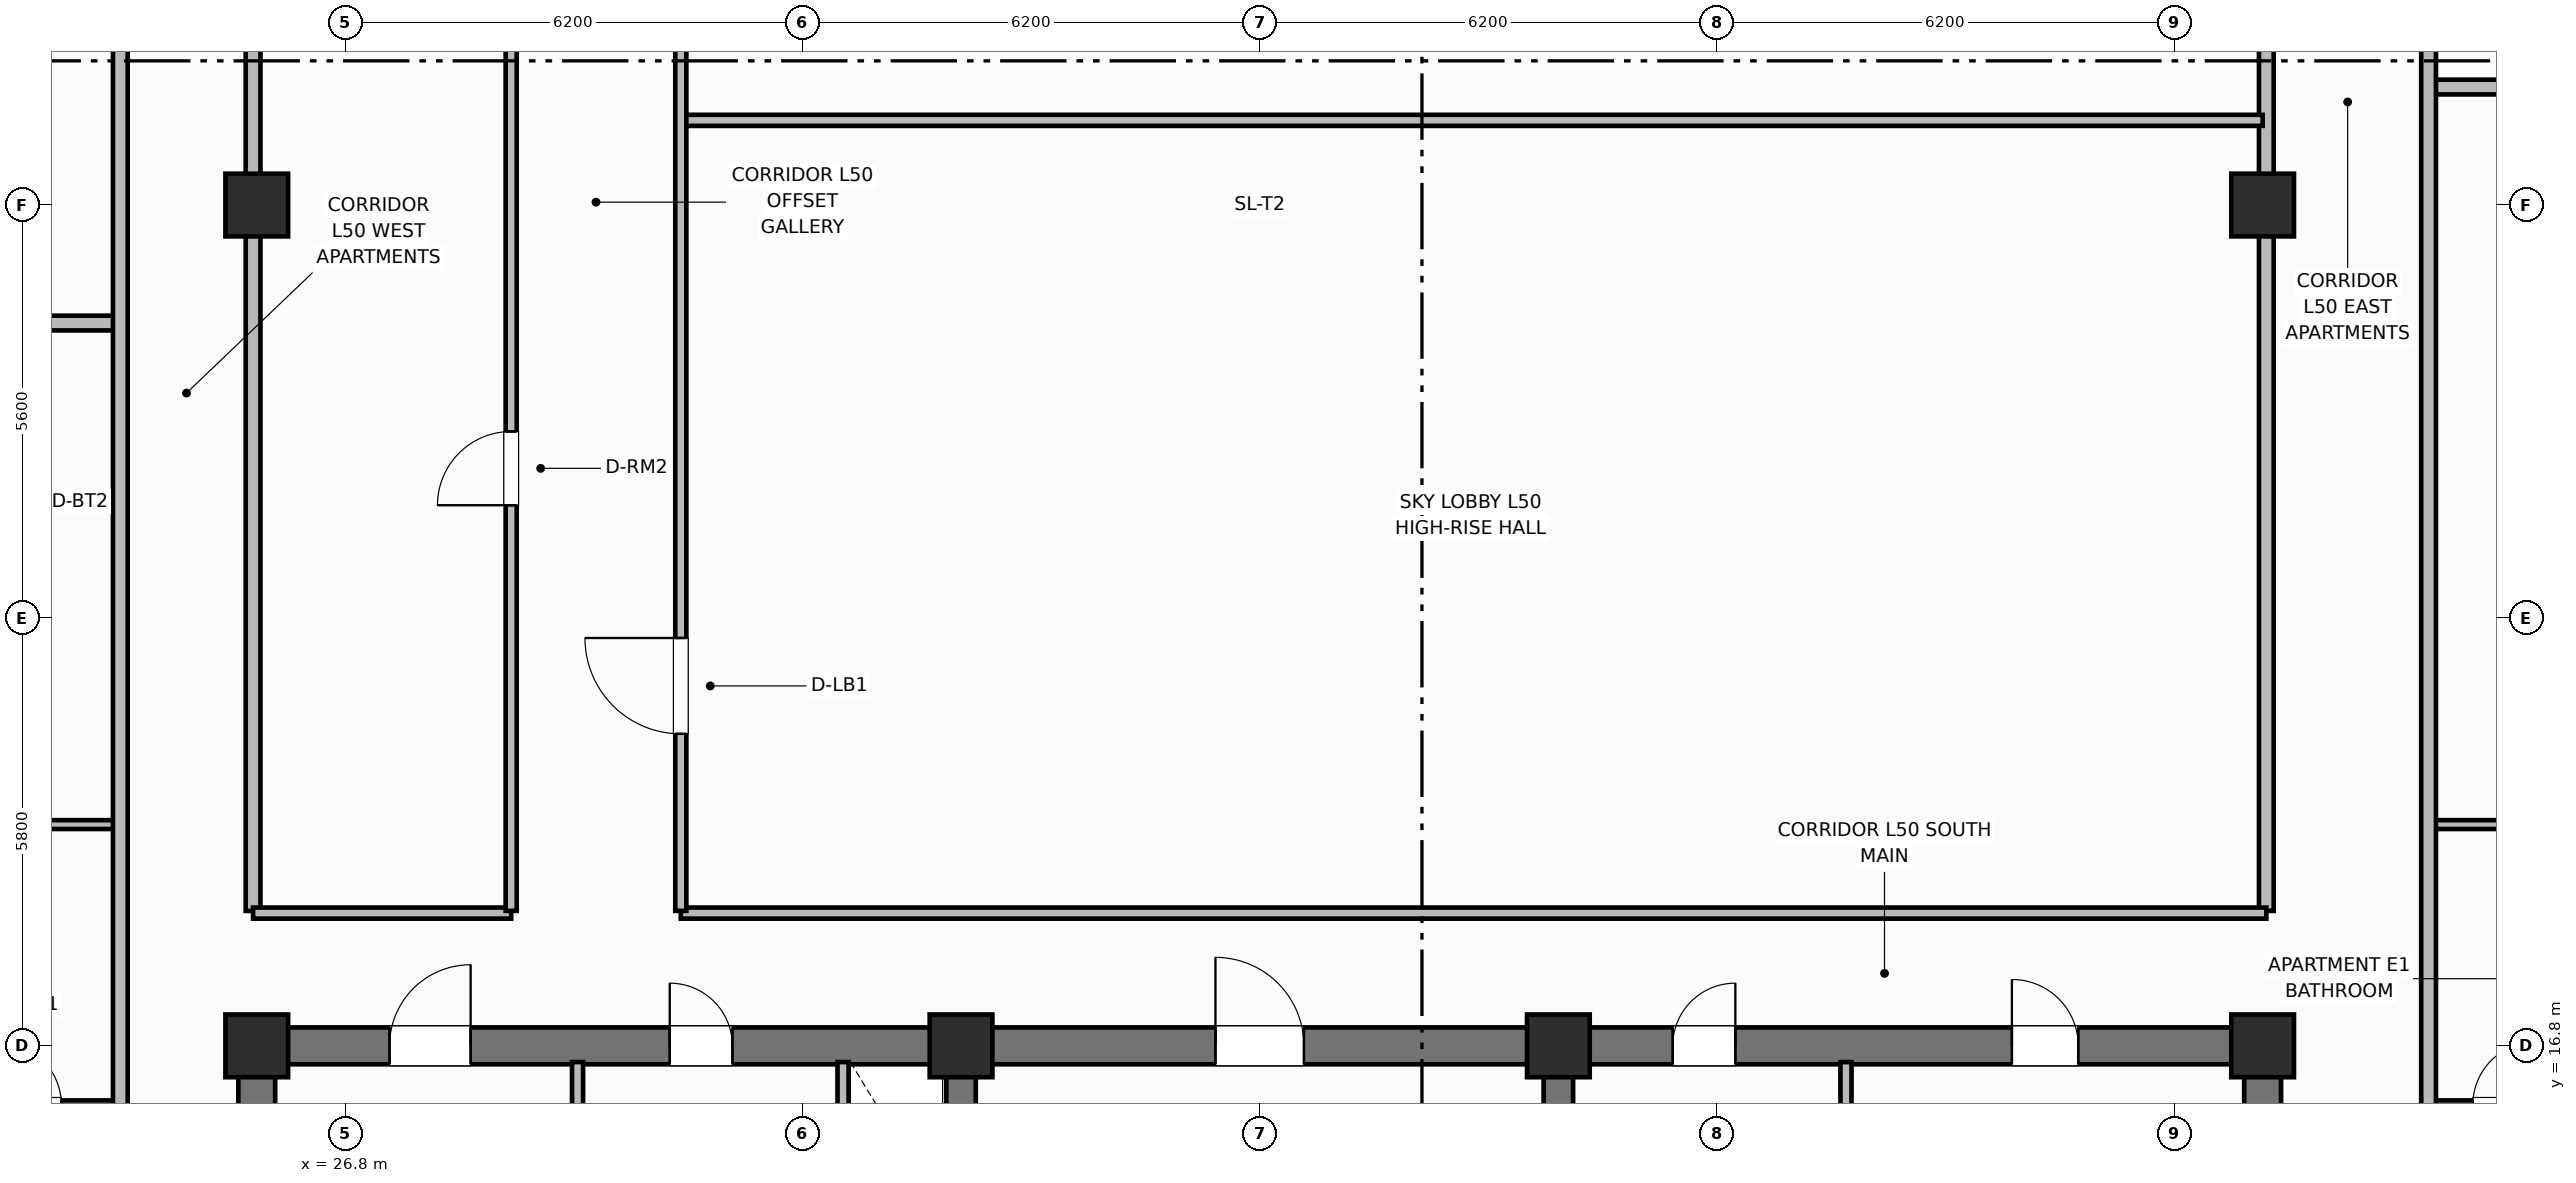
"""IFC4 building model, lengths in metres.
Left out: names, types, materials, properties, quantities, classifications, styles, units other than length and angle.
Written with IfcOpenShell. Run it as: python <this file> out.ifc"""

import sys

from ifc_helpers import new_model, si_unit, direction, frame, frame_2d, origin, origin_2d, place, context, subcontext, project, spatial, rectangle, extrude, element, fill, save


model = new_model("IFC4")
c1 = context("Model", 3, precision=1e-05, world=origin(), true_north=direction((0.0, 1.0)))
c2 = subcontext(c1, "Body", "Model", "MODEL_VIEW")
j1 = project(units=[si_unit("LENGTHUNIT", "METRE"), si_unit("PLANEANGLEUNIT", "RADIAN")], contexts=[c1])
p1 = place(None, origin())
s1 = spatial("IfcSite", under=j1, at=p1, CompositionType="ELEMENT")
p2 = place(p1, origin())
s2 = spatial("IfcBuilding", under=s1, at=p2, CompositionType="ELEMENT")
p3 = place(p2, frame((0.0, 0.0, 203.1)))
s3 = spatial("IfcBuildingStorey", under=s2, at=p3, CompositionType="ELEMENT", Elevation=203.1)
for number, where, z_axis, x_axis in (
    (1, (25.6, 10.85, 0.0), (0.0, 0.0, 1.0), (0.0, 1.0, 0.0)),
    (2, (52.8, 10.85, 0.0), (0.0, 0.0, 1.0), (0.0, 1.0, 0.0)),
):
    element("IfcWall", number, at=place(p3, frame(where, z_axis=z_axis, x_axis=x_axis)), inside=s3, PredefinedType="SHEAR", context=c2, shape_type="SweptSolid", body=[
        extrude(rectangle(XDim=5.7, YDim=0.5, at=frame_2d((2.85, 0.0))), origin(), (0.0, 0.0, 1.0), 4.2),
    ])
p4 = place(p3, frame((25.6, 16.8, 0.0), z_axis=(0.0, 0.0, 1.0), x_axis=(1.0, 0.0, 0.0)))
e3 = element("IfcWall", 3, at=p4, inside=s3, PredefinedType="SHEAR", context=c2, shape_type="SweptSolid", body=[
    extrude(rectangle(XDim=27.2, YDim=0.5, at=frame_2d((13.6, 0.0))), origin(), (0.0, 0.0, 1.0), 4.2),
])
p5 = place(p4, frame((1.8, 0.0, 0.0)))
e4 = element("IfcOpeningElement", 4, at=p5, cuts=e3, PredefinedType="OPENING", context=c2, shape_type="SweptSolid", body=[
    extrude(rectangle(XDim=1.1, YDim=2.15, at=frame_2d((0.55, 1.075))), frame((0.0, 0.26, 0.0), z_axis=(0.0, -1.0, 0.0), x_axis=(1.0, 0.0, 0.0)), (0.0, 0.0, 1.0), 0.52),
])
p6 = place(p4, frame((5.6, 0.0, 0.0)))
e5 = element("IfcOpeningElement", 5, at=p6, cuts=e3, PredefinedType="OPENING", context=c2, shape_type="SweptSolid", body=[
    extrude(rectangle(XDim=0.85, YDim=2.1, at=frame_2d((0.425, 1.05))), frame((0.0, 0.26, 0.0), z_axis=(0.0, -1.0, 0.0), x_axis=(1.0, 0.0, 0.0)), (0.0, 0.0, 1.0), 0.52),
])
p7 = place(p4, frame((13.0, 0.0, 0.0)))
e6 = element("IfcOpeningElement", 6, at=p7, cuts=e3, PredefinedType="OPENING", context=c2, shape_type="SweptSolid", body=[
    extrude(rectangle(XDim=1.2, YDim=2.15, at=frame_2d((0.6, 1.075))), frame((0.0, 0.26, 0.0), z_axis=(0.0, -1.0, 0.0), x_axis=(1.0, 0.0, 0.0)), (0.0, 0.0, 1.0), 0.52),
])
p8 = place(p4, frame((19.2, 0.0, 0.0)))
e7 = element("IfcOpeningElement", 7, at=p8, cuts=e3, PredefinedType="OPENING", context=c2, shape_type="SweptSolid", body=[
    extrude(rectangle(XDim=0.85, YDim=2.1, at=frame_2d((0.425, 1.05))), frame((0.0, 0.26, 0.0), z_axis=(0.0, -1.0, 0.0), x_axis=(1.0, 0.0, 0.0)), (0.0, 0.0, 1.0), 0.52),
])
p9 = place(p4, frame((23.8, 0.0, 0.0)))
e8 = element("IfcOpeningElement", 8, at=p9, cuts=e3, PredefinedType="OPENING", context=c2, shape_type="SweptSolid", body=[
    extrude(rectangle(XDim=0.9, YDim=2.1, at=frame_2d((0.45, 1.05))), frame((0.0, 0.26, 0.0), z_axis=(0.0, -1.0, 0.0), x_axis=(1.0, 0.0, 0.0)), (0.0, 0.0, 1.0), 0.52),
])
for number, where, z_axis, x_axis in (
    (9, (35.15, 10.85, 0.0), (0.0, 0.0, 1.0), (0.0, 1.0, 0.0)),
    (10, (43.25, 10.85, 0.0), (0.0, 0.0, 1.0), (0.0, 1.0, 0.0)),
):
    element("IfcWall", number, at=place(p3, frame(where, z_axis=z_axis, x_axis=x_axis)), inside=s3, PredefinedType="SHEAR", context=c2, shape_type="SweptSolid", body=[
        extrude(rectangle(XDim=5.7, YDim=0.4, at=frame_2d((2.85, 0.0))), origin(), (0.0, 0.0, 1.0), 4.2),
    ])
for number, where, z_axis, x_axis in (
    (11, (25.6, 16.8, 0.0), (0.0, 0.0, 1.0), (1.0, 0.0, 0.0)),
    (12, (35.15, 16.8, 0.0), (0.0, 0.0, 1.0), (1.0, 0.0, 0.0)),
    (13, (43.25, 16.8, 0.0), (0.0, 0.0, 1.0), (1.0, 0.0, 0.0)),
    (14, (52.8, 16.8, 0.0), (0.0, 0.0, 1.0), (1.0, 0.0, 0.0)),
    (15, (25.6, 28.2, 0.0), (0.0, 0.0, 1.0), (1.0, 0.0, 0.0)),
    (16, (52.8, 28.2, 0.0), (0.0, 0.0, 1.0), (1.0, 0.0, 0.0)),
):
    element("IfcColumn", number, at=place(p3, frame(where, z_axis=z_axis, x_axis=x_axis)), inside=s3, PredefinedType="COLUMN", context=c2, shape_type="SweptSolid", body=[
        extrude(rectangle(XDim=0.85, YDim=0.85, at=origin_2d()), origin(), (0.0, 0.0, 1.0), 4.2),
    ])
p10 = place(p3, frame((29.95, 14.5, 0.0), z_axis=(0.0, 0.0, 1.0), x_axis=(0.0, 1.0, 0.0)))
e17 = element("IfcWall", 17, at=p10, inside=s3, PredefinedType="PARTITIONING", context=c2, shape_type="SweptSolid", body=[
    extrude(rectangle(XDim=2.08, YDim=0.15, at=frame_2d((1.04, 0.0))), origin(), (0.0, 0.0, 1.0), 3.05),
])
p11 = place(p3, frame((33.55, 14.5, 0.0), z_axis=(0.0, 0.0, 1.0), x_axis=(0.0, 1.0, 0.0)))
e18 = element("IfcWall", 18, at=p11, inside=s3, PredefinedType="PARTITIONING", context=c2, shape_type="SweptSolid", body=[
    extrude(rectangle(XDim=2.08, YDim=0.15, at=frame_2d((1.04, 0.0))), origin(), (0.0, 0.0, 1.0), 3.05),
])
p12 = place(p11, frame((0.55, 0.0, 0.0)))
e19 = element("IfcOpeningElement", 19, at=p12, cuts=e18, PredefinedType="OPENING", context=c2, shape_type="SweptSolid", body=[
    extrude(rectangle(XDim=0.85, YDim=2.05, at=frame_2d((0.425, 1.025))), frame((0.0, 0.085, 0.0), z_axis=(0.0, -1.0, 0.0), x_axis=(1.0, 0.0, 0.0)), (0.0, 0.0, 1.0), 0.17),
])
p13 = place(p3, frame((47.15, 10.95, 0.0), z_axis=(0.0, 0.0, 1.0), x_axis=(0.0, 1.0, 0.0)))
e20 = element("IfcWall", 20, at=p13, inside=s3, PredefinedType="PARTITIONING", context=c2, shape_type="SweptSolid", body=[
    extrude(rectangle(XDim=5.63, YDim=0.15, at=frame_2d((2.815, 0.0))), origin(), (0.0, 0.0, 1.0), 3.05),
])
for number, where, z_axis, x_axis in (
    (21, (25.55, 18.63, 0.0), (0.0, 0.0, 1.0), (0.0, 1.0, 0.0)),
    (22, (52.85, 18.63, 0.0), (0.0, 0.0, 1.0), (0.0, 1.0, 0.0)),
):
    element("IfcWall", number, at=place(p3, frame(where, z_axis=z_axis, x_axis=x_axis)), inside=s3, PredefinedType="PARTITIONING", context=c2, shape_type="SweptSolid", body=[
        extrude(rectangle(XDim=19.14, YDim=0.2, at=frame_2d((9.57, 0.0))), origin(), (0.0, 0.0, 1.0), 3.05),
    ])
p14 = place(p3, frame((25.55, 18.6, 0.0), z_axis=(0.0, 0.0, 1.0), x_axis=(1.0, 0.0, 0.0)))
e23 = element("IfcWall", 23, at=p14, inside=s3, PredefinedType="PARTITIONING", context=c2, shape_type="SweptSolid", body=[
    extrude(rectangle(XDim=3.5, YDim=0.15, at=frame_2d((1.75, 0.0))), origin(), (0.0, 0.0, 1.0), 3.05),
])
p15 = place(p3, frame((31.35, 18.6, 0.0), z_axis=(0.0, 0.0, 1.0), x_axis=(1.0, 0.0, 0.0)))
e24 = element("IfcWall", 24, at=p15, inside=s3, PredefinedType="PARTITIONING", context=c2, shape_type="SweptSolid", body=[
    extrude(rectangle(XDim=21.5, YDim=0.15, at=frame_2d((10.75, 0.0))), origin(), (0.0, 0.0, 1.0), 3.05),
])
p16 = place(p3, frame((31.38, 29.348, 0.0), z_axis=(0.0, 0.0, 1.0), x_axis=(1.0, 0.0, 0.0)))
e25 = element("IfcWall", 25, at=p16, inside=s3, PredefinedType="PARTITIONING", context=c2, shape_type="SweptSolid", body=[
    extrude(rectangle(XDim=21.42, YDim=0.15, at=frame_2d((10.71, 0.0))), origin(), (0.0, 0.0, 1.0), 3.05),
])
p17 = place(p3, frame((29.05, 18.63, 0.0), z_axis=(0.0, 0.0, 1.0), x_axis=(0.0, 1.0, 0.0)))
e26 = element("IfcWall", 26, at=p17, inside=s3, PredefinedType="PARTITIONING", context=c2, shape_type="SweptSolid", body=[
    extrude(rectangle(XDim=19.14, YDim=0.15, at=frame_2d((9.57, 0.0))), origin(), (0.0, 0.0, 1.0), 3.05),
])
p18 = place(p17, frame((5.5, 0.0, 0.0)))
e27 = element("IfcOpeningElement", 27, at=p18, cuts=e26, PredefinedType="OPENING", context=c2, shape_type="SweptSolid", body=[
    extrude(rectangle(XDim=1.0, YDim=2.15, at=frame_2d((0.5, 1.075))), frame((0.0, 0.085, 0.0), z_axis=(0.0, -1.0, 0.0), x_axis=(1.0, 0.0, 0.0)), (0.0, 0.0, 1.0), 0.17),
])
p19 = place(p3, frame((31.35, 18.63, 0.0), z_axis=(0.0, 0.0, 1.0), x_axis=(0.0, 1.0, 0.0)))
e28 = element("IfcWall", 28, at=p19, inside=s3, PredefinedType="PARTITIONING", context=c2, shape_type="SweptSolid", body=[
    extrude(rectangle(XDim=19.14, YDim=0.15, at=frame_2d((9.57, 0.0))), origin(), (0.0, 0.0, 1.0), 3.05),
])
p20 = place(p19, frame((2.4, 0.0, 0.0)))
e29 = element("IfcOpeningElement", 29, at=p20, cuts=e28, PredefinedType="OPENING", context=c2, shape_type="SweptSolid", body=[
    extrude(rectangle(XDim=1.3, YDim=2.2, at=frame_2d((0.65, 1.1))), frame((0.0, 0.085, 0.0), z_axis=(0.0, -1.0, 0.0), x_axis=(1.0, 0.0, 0.0)), (0.0, 0.0, 1.0), 0.17),
])
p21 = place(p19, frame((12.719, 0.0, 0.0)))
e30 = element("IfcOpeningElement", 30, at=p21, cuts=e28, PredefinedType="OPENING", context=c2, shape_type="SweptSolid", body=[
    extrude(rectangle(XDim=1.0, YDim=2.15, at=frame_2d((0.5, 1.075))), frame((0.0, 0.085, 0.0), z_axis=(0.0, -1.0, 0.0), x_axis=(1.0, 0.0, 0.0)), (0.0, 0.0, 1.0), 0.17),
])
p22 = place(p3, frame((21.5, 16.0, 0.0), z_axis=(0.0, 0.0, 1.0), x_axis=(1.0, 0.0, 0.0)))
e31 = element("IfcWall", 31, at=p22, inside=s3, PredefinedType="PARTITIONING", context=c2, shape_type="SweptSolid", body=[
    extrude(rectangle(XDim=2.25, YDim=0.12, at=frame_2d((1.125, 0.0))), origin(), (0.0, 0.0, 1.0), 3.05),
])
p23 = place(p22, frame((0.6, 0.0, 0.0)))
e32 = element("IfcOpeningElement", 32, at=p23, cuts=e31, PredefinedType="OPENING", context=c2, shape_type="SweptSolid", body=[
    extrude(rectangle(XDim=0.85, YDim=2.1, at=frame_2d((0.425, 1.05))), frame((0.0, 0.07, 0.0), z_axis=(0.0, -1.0, 0.0), x_axis=(1.0, 0.0, 0.0)), (0.0, 0.0, 1.0), 0.14),
])
p24 = place(p3, frame((21.5, 19.8, 0.0), z_axis=(0.0, 0.0, 1.0), x_axis=(1.0, 0.0, 0.0)))
e33 = element("IfcWall", 33, at=p24, inside=s3, PredefinedType="PARTITIONING", context=c2, shape_type="SweptSolid", body=[
    extrude(rectangle(XDim=2.25, YDim=0.12, at=frame_2d((1.125, 0.0))), origin(), (0.0, 0.0, 1.0), 3.05),
])
p25 = place(p3, frame((16.97, 26.6, 0.0), z_axis=(0.0, 0.0, 1.0), x_axis=(1.0, 0.0, 0.0)))
e34 = element("IfcWall", 34, at=p25, inside=s3, PredefinedType="PARTITIONING", context=c2, shape_type="SweptSolid", body=[
    extrude(rectangle(XDim=6.78, YDim=0.2, at=frame_2d((3.39, 0.0))), origin(), (0.0, 0.0, 1.0), 3.05),
])
p26 = place(p3, frame((23.75, 10.6, 0.0), z_axis=(0.0, 0.0, 1.0), x_axis=(0.0, 1.0, 0.0)))
e35 = element("IfcWall", 35, at=p26, inside=s3, PredefinedType="PARTITIONING", context=c2, shape_type="SweptSolid", body=[
    extrude(rectangle(XDim=35.2, YDim=0.2, at=frame_2d((17.6, 0.0))), origin(), (0.0, 0.0, 1.0), 3.05),
])
p27 = place(p26, frame((2.65, 0.0, 0.0)))
e36 = element("IfcOpeningElement", 36, at=p27, cuts=e35, PredefinedType="OPENING", context=c2, shape_type="SweptSolid", body=[
    extrude(rectangle(XDim=1.0, YDim=2.15, at=frame_2d((0.5, 1.075))), frame((0.0, 0.11, 0.0), z_axis=(0.0, -1.0, 0.0), x_axis=(1.0, 0.0, 0.0)), (0.0, 0.0, 1.0), 0.22),
])
p28 = place(p26, frame((19.95, 0.0, 0.0)))
e37 = element("IfcOpeningElement", 37, at=p28, cuts=e35, PredefinedType="OPENING", context=c2, shape_type="SweptSolid", body=[
    extrude(rectangle(XDim=1.0, YDim=2.15, at=frame_2d((0.5, 1.075))), frame((0.0, 0.11, 0.0), z_axis=(0.0, -1.0, 0.0), x_axis=(1.0, 0.0, 0.0)), (0.0, 0.0, 1.0), 0.22),
])
p29 = place(p3, frame((55.05, 16.0, 0.0), z_axis=(0.0, 0.0, 1.0), x_axis=(1.0, 0.0, 0.0)))
e38 = element("IfcWall", 38, at=p29, inside=s3, PredefinedType="PARTITIONING", context=c2, shape_type="SweptSolid", body=[
    extrude(rectangle(XDim=2.25, YDim=0.12, at=frame_2d((1.125, 0.0))), origin(), (0.0, 0.0, 1.0), 3.05),
])
p30 = place(p29, frame((0.6, 0.0, 0.0)))
e39 = element("IfcOpeningElement", 39, at=p30, cuts=e38, PredefinedType="OPENING", context=c2, shape_type="SweptSolid", body=[
    extrude(rectangle(XDim=0.85, YDim=2.1, at=frame_2d((0.425, 1.05))), frame((0.0, 0.07, 0.0), z_axis=(0.0, -1.0, 0.0), x_axis=(1.0, 0.0, 0.0)), (0.0, 0.0, 1.0), 0.14),
])
p31 = place(p3, frame((55.05, 19.8, 0.0), z_axis=(0.0, 0.0, 1.0), x_axis=(1.0, 0.0, 0.0)))
e40 = element("IfcWall", 40, at=p31, inside=s3, PredefinedType="PARTITIONING", context=c2, shape_type="SweptSolid", body=[
    extrude(rectangle(XDim=2.25, YDim=0.12, at=frame_2d((1.125, 0.0))), origin(), (0.0, 0.0, 1.0), 3.05),
])
p32 = place(p3, frame((55.05, 29.8, 0.0), z_axis=(0.0, 0.0, 1.0), x_axis=(1.0, 0.0, 0.0)))
e41 = element("IfcWall", 41, at=p32, inside=s3, PredefinedType="PARTITIONING", context=c2, shape_type="SweptSolid", body=[
    extrude(rectangle(XDim=6.38, YDim=0.2, at=frame_2d((3.19, 0.0))), origin(), (0.0, 0.0, 1.0), 3.05),
])
p33 = place(p3, frame((55.05, 10.6, 0.0), z_axis=(0.0, 0.0, 1.0), x_axis=(0.0, 1.0, 0.0)))
e42 = element("IfcWall", 42, at=p33, inside=s3, PredefinedType="PARTITIONING", context=c2, shape_type="SweptSolid", body=[
    extrude(rectangle(XDim=35.2, YDim=0.2, at=frame_2d((17.6, 0.0))), origin(), (0.0, 0.0, 1.0), 3.05),
])
p34 = place(p33, frame((2.65, 0.0, 0.0)))
e43 = element("IfcOpeningElement", 43, at=p34, cuts=e42, PredefinedType="OPENING", context=c2, shape_type="SweptSolid", body=[
    extrude(rectangle(XDim=1.0, YDim=2.15, at=frame_2d((0.5, 1.075))), frame((0.0, 0.11, 0.0), z_axis=(0.0, -1.0, 0.0), x_axis=(1.0, 0.0, 0.0)), (0.0, 0.0, 1.0), 0.22),
])
p35 = place(p33, frame((22.75, 0.0, 0.0)))
e44 = element("IfcOpeningElement", 44, at=p35, cuts=e42, PredefinedType="OPENING", context=c2, shape_type="SweptSolid", body=[
    extrude(rectangle(XDim=1.0, YDim=2.15, at=frame_2d((0.5, 1.075))), frame((0.0, 0.11, 0.0), z_axis=(0.0, -1.0, 0.0), x_axis=(1.0, 0.0, 0.0)), (0.0, 0.0, 1.0), 0.22),
])
p36 = place(p18, origin())
e45 = element("IfcDoor", 45, at=p36, inside=s3, OperationType="SINGLE_SWING_LEFT", PredefinedType="DOOR", context=c2, shape_type="SweptSolid", body=[
    extrude(rectangle(XDim=1.0, YDim=2.15, at=frame_2d((0.5, 1.075))), frame((0.0, 0.025, 0.0), z_axis=(0.0, -1.0, 0.0), x_axis=(1.0, 0.0, 0.0)), (0.0, 0.0, 1.0), 0.05),
])
fill(e27, e45)
p37 = place(p20, origin())
e46 = element("IfcDoor", 46, at=p37, inside=s3, OperationType="SINGLE_SWING_RIGHT", PredefinedType="DOOR", context=c2, shape_type="SweptSolid", body=[
    extrude(rectangle(XDim=1.3, YDim=2.2, at=frame_2d((0.65, 1.1))), frame((0.0, 0.025, 0.0), z_axis=(0.0, -1.0, 0.0), x_axis=(1.0, 0.0, 0.0)), (0.0, 0.0, 1.0), 0.05),
])
fill(e29, e46)
p38 = place(p23, origin())
e47 = element("IfcDoor", 47, at=p38, inside=s3, OperationType="SINGLE_SWING_LEFT", PredefinedType="DOOR", context=c2, shape_type="SweptSolid", body=[
    extrude(rectangle(XDim=0.85, YDim=2.1, at=frame_2d((0.425, 1.05))), frame((0.0, 0.025, 0.0), z_axis=(0.0, -1.0, 0.0), x_axis=(1.0, 0.0, 0.0)), (0.0, 0.0, 1.0), 0.05),
])
fill(e32, e47)
p39 = place(p30, origin())
e48 = element("IfcDoor", 48, at=p39, inside=s3, OperationType="SINGLE_SWING_RIGHT", PredefinedType="DOOR", context=c2, shape_type="SweptSolid", body=[
    extrude(rectangle(XDim=0.85, YDim=2.1, at=frame_2d((0.425, 1.05))), frame((0.0, 0.025, 0.0), z_axis=(0.0, -1.0, 0.0), x_axis=(1.0, 0.0, 0.0)), (0.0, 0.0, 1.0), 0.05),
])
fill(e39, e48)
p40 = place(p5, origin())
e49 = element("IfcDoor", 49, at=p40, inside=s3, OperationType="SINGLE_SWING_RIGHT", PredefinedType="DOOR", context=c2, shape_type="SweptSolid", body=[
    extrude(rectangle(XDim=1.1, YDim=2.15, at=frame_2d((0.55, 1.075))), frame((0.0, 0.025, 0.0), z_axis=(0.0, -1.0, 0.0), x_axis=(1.0, 0.0, 0.0)), (0.0, 0.0, 1.0), 0.05),
])
fill(e4, e49)
p41 = place(p6, origin())
e50 = element("IfcDoor", 50, at=p41, inside=s3, OperationType="SINGLE_SWING_LEFT", PredefinedType="DOOR", context=c2, shape_type="SweptSolid", body=[
    extrude(rectangle(XDim=0.85, YDim=2.1, at=frame_2d((0.425, 1.05))), frame((0.0, 0.025, 0.0), z_axis=(0.0, -1.0, 0.0), x_axis=(1.0, 0.0, 0.0)), (0.0, 0.0, 1.0), 0.05),
])
fill(e5, e50)
p42 = place(p7, origin())
e51 = element("IfcDoor", 51, at=p42, inside=s3, OperationType="SINGLE_SWING_LEFT", PredefinedType="DOOR", context=c2, shape_type="SweptSolid", body=[
    extrude(rectangle(XDim=1.2, YDim=2.15, at=frame_2d((0.6, 1.075))), frame((0.0, 0.025, 0.0), z_axis=(0.0, -1.0, 0.0), x_axis=(1.0, 0.0, 0.0)), (0.0, 0.0, 1.0), 0.05),
])
fill(e6, e51)
p43 = place(p8, origin())
e52 = element("IfcDoor", 52, at=p43, inside=s3, OperationType="SINGLE_SWING_RIGHT", PredefinedType="DOOR", context=c2, shape_type="SweptSolid", body=[
    extrude(rectangle(XDim=0.85, YDim=2.1, at=frame_2d((0.425, 1.05))), frame((0.0, 0.025, 0.0), z_axis=(0.0, -1.0, 0.0), x_axis=(1.0, 0.0, 0.0)), (0.0, 0.0, 1.0), 0.05),
])
fill(e7, e52)
p44 = place(p9, origin())
e53 = element("IfcDoor", 53, at=p44, inside=s3, OperationType="SINGLE_SWING_LEFT", PredefinedType="DOOR", context=c2, shape_type="SweptSolid", body=[
    extrude(rectangle(XDim=0.9, YDim=2.1, at=frame_2d((0.45, 1.05))), frame((0.0, 0.025, 0.0), z_axis=(0.0, -1.0, 0.0), x_axis=(1.0, 0.0, 0.0)), (0.0, 0.0, 1.0), 0.05),
])
fill(e8, e53)
save(model, sys.argv[1])
